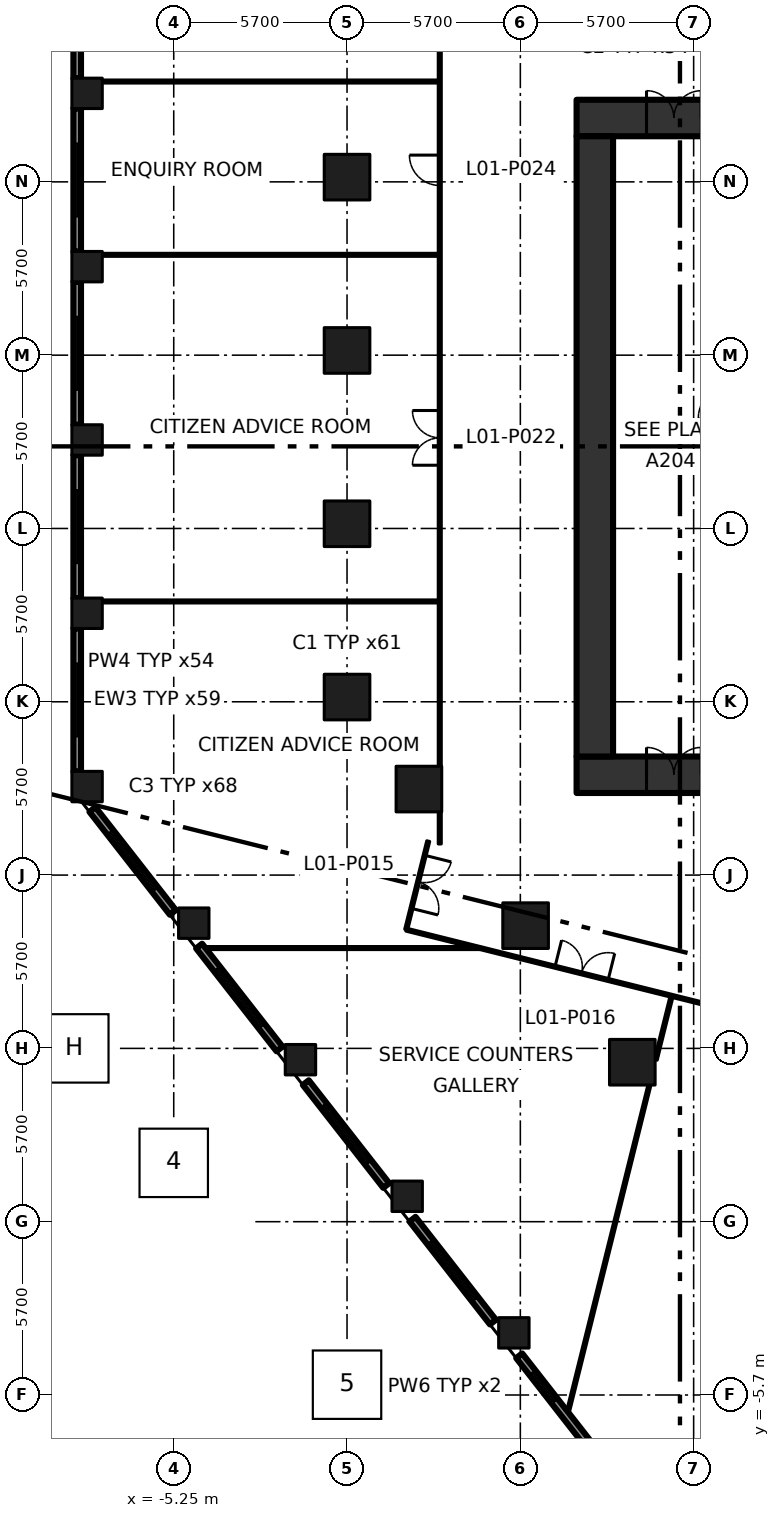
"""IFC4 building model, lengths in metres.
Left out: names, types, materials, properties, quantities, classifications, styles, units other than length and angle.
Written with IfcOpenShell. Run it as: python <this file> out.ifc"""

import sys

from ifc_helpers import new_model, si_unit, direction, frame, frame_2d, origin, origin_2d, place, context, subcontext, project, spatial, rectangle, extrude, element, fill, save


model = new_model("IFC4")
c1 = context("Model", 3, precision=1e-05, world=origin(), true_north=direction((0.0, 1.0)))
c2 = subcontext(c1, "Body", "Model", "MODEL_VIEW")
j1 = project(units=[si_unit("LENGTHUNIT", "METRE"), si_unit("PLANEANGLEUNIT", "RADIAN")], contexts=[c1])
p1 = place(None, origin())
s1 = spatial("IfcSite", under=j1, at=p1, CompositionType="ELEMENT")
p2 = place(p1, origin())
s2 = spatial("IfcBuilding", under=s1, at=p2, CompositionType="ELEMENT")
p3 = place(p2, frame((0.0, 0.0, 7.2)))
s3 = spatial("IfcBuildingStorey", under=s2, at=p3, CompositionType="ELEMENT", Elevation=7.2)
for number, where, z_axis, x_axis in (
    (1, (0.45, 17.255, 0.0), (0.0, 0.0, 1.0), (1.0, 0.0, 0.0)),
    (2, (0.45, 22.955, 0.0), (0.0, 0.0, 1.0), (1.0, 0.0, 0.0)),
    (3, (0.45, 28.655, 0.0), (0.0, 0.0, 1.0), (1.0, 0.0, 0.0)),
    (4, (0.45, 34.355, 0.0), (0.0, 0.0, 1.0), (1.0, 0.0, 0.0)),
    (5, (9.833, 5.245, 0.0), (0.0, 0.0, 1.0), (1.0, 0.0, 0.0)),
    (6, (6.323, 9.737, 0.0), (0.0, 0.0, 1.0), (1.0, 0.0, 0.0)),
    (7, (2.814, 14.229, 0.0), (0.0, 0.0, 1.0), (1.0, 0.0, 0.0)),
):
    element("IfcColumn", number, at=place(p3, frame(where, z_axis=z_axis, x_axis=x_axis)), inside=s3, PredefinedType="COLUMN", context=c2, shape_type="SweptSolid", body=[
        extrude(rectangle(XDim=1.5, YDim=1.5, at=origin_2d()), origin(), (0.0, 0.0, 1.0), 5.4),
    ])
for number, where, z_axis, x_axis in (
    (8, (-8.1, 14.311, 0.0), (0.0, 0.0, 1.0), (1.0, 0.0, 0.0)),
    (9, (-8.1, 20.011, 0.0), (0.0, 0.0, 1.0), (1.0, 0.0, 0.0)),
    (10, (-8.1, 25.711, 0.0), (0.0, 0.0, 1.0), (1.0, 0.0, 0.0)),
    (11, (-8.1, 31.411, 0.0), (0.0, 0.0, 1.0), (1.0, 0.0, 0.0)),
    (12, (-8.1, 37.111, 0.0), (0.0, 0.0, 1.0), (1.0, 0.0, 0.0)),
    (13, (-4.591, 9.819, 0.0), (0.0, 0.0, 1.0), (1.0, 0.0, 0.0)),
    (14, (-1.082, 5.328, 0.0), (0.0, 0.0, 1.0), (1.0, 0.0, 0.0)),
    (15, (2.428, 0.836, 0.0), (0.0, 0.0, 1.0), (1.0, 0.0, 0.0)),
    (16, (5.937, -3.656, 0.0), (0.0, 0.0, 1.0), (1.0, 0.0, 0.0)),
):
    element("IfcColumn", number, at=place(p3, frame(where, z_axis=z_axis, x_axis=x_axis)), inside=s3, PredefinedType="COLUMN", context=c2, shape_type="SweptSolid", body=[
        extrude(rectangle(XDim=1.0, YDim=1.0, at=origin_2d()), origin(), (0.0, 0.0, 1.0), 5.4),
    ])
p4 = place(p3, frame((8.0, 14.7, -0.45), z_axis=(0.0, 0.0, 1.0), x_axis=(1.0, 0.0, 0.0)))
e17 = element("IfcWall", 17, at=p4, inside=s3, PredefinedType="SHEAR", context=c2, shape_type="SweptSolid", body=[
    extrude(rectangle(XDim=22.8, YDim=1.2, at=frame_2d((11.4, 0.0))), origin(), (0.0, 0.0, 1.0), 5.4),
])
p5 = place(p4, frame((2.3, 0.0, 0.45)))
e18 = element("IfcOpeningElement", 18, at=p5, cuts=e17, PredefinedType="OPENING", context=c2, shape_type="SweptSolid", body=[
    extrude(rectangle(XDim=1.8, YDim=2.1, at=frame_2d((0.9, 1.05))), frame((0.0, 0.61, 0.0), z_axis=(0.0, -1.0, 0.0), x_axis=(1.0, 0.0, 0.0)), (0.0, 0.0, 1.0), 1.22),
])
p6 = place(p3, frame((8.0, 36.3, -0.45), z_axis=(0.0, 0.0, 1.0), x_axis=(1.0, 0.0, 0.0)))
e19 = element("IfcWall", 19, at=p6, inside=s3, PredefinedType="SHEAR", context=c2, shape_type="SweptSolid", body=[
    extrude(rectangle(XDim=22.8, YDim=1.2, at=frame_2d((11.4, 0.0))), origin(), (0.0, 0.0, 1.0), 5.4),
])
p7 = place(p6, frame((2.3, 0.0, 0.45)))
e20 = element("IfcOpeningElement", 20, at=p7, cuts=e19, PredefinedType="OPENING", context=c2, shape_type="SweptSolid", body=[
    extrude(rectangle(XDim=1.8, YDim=2.1, at=frame_2d((0.9, 1.05))), frame((0.0, 0.61, 0.0), z_axis=(0.0, -1.0, 0.0), x_axis=(1.0, 0.0, 0.0)), (0.0, 0.0, 1.0), 1.22),
])
p8 = place(p3, frame((8.6, 15.3, -0.45), z_axis=(0.0, 0.0, 1.0), x_axis=(0.0, 1.0, 0.0)))
e21 = element("IfcWall", 21, at=p8, inside=s3, PredefinedType="SHEAR", context=c2, shape_type="SweptSolid", body=[
    extrude(rectangle(XDim=20.4, YDim=1.2, at=frame_2d((10.2, 0.0))), origin(), (0.0, 0.0, 1.0), 5.4),
])
p9 = place(p3, frame((2.395, 9.606, 0.0), z_axis=(0.0, 0.0, 1.0), x_axis=(0.970307527636, -0.241874558011, 0.0)))
e22 = element("IfcWall", 22, at=p9, inside=s3, PredefinedType="PARTITIONING", context=c2, shape_type="SweptSolid", body=[
    extrude(rectangle(XDim=16.859, YDim=0.1, at=frame_2d((8.43, 0.0))), origin(), (0.0, 0.0, 1.0), 4.95),
])
p10 = place(p9, frame((5.045, 0.0, 0.0)))
e23 = element("IfcOpeningElement", 23, at=p10, cuts=e22, PredefinedType="OPENING", context=c2, shape_type="SweptSolid", body=[
    extrude(rectangle(XDim=1.8, YDim=2.1, at=frame_2d((0.9, 1.05))), frame((0.0, 0.06, 0.0), z_axis=(0.0, -1.0, 0.0), x_axis=(1.0, 0.0, 0.0)), (0.0, 0.0, 1.0), 0.12),
])
p11 = place(p9, frame((12.28, 0.0, 0.0)))
e24 = element("IfcOpeningElement", 24, at=p11, cuts=e22, PredefinedType="OPENING", context=c2, shape_type="SweptSolid", body=[
    extrude(rectangle(XDim=1.0, YDim=2.1, at=frame_2d((0.5, 1.05))), frame((0.0, 0.06, 0.0), z_axis=(0.0, -1.0, 0.0), x_axis=(1.0, 0.0, 0.0)), (0.0, 0.0, 1.0), 0.12),
])
p12 = place(p3, frame((3.121, 12.517, 0.0), z_axis=(0.0, 0.0, 1.0), x_axis=(-0.241999491975, -0.970276376031, 0.0)))
e25 = element("IfcWall", 25, at=p12, inside=s3, PredefinedType="PARTITIONING", context=c2, shape_type="SweptSolid", body=[
    extrude(rectangle(XDim=3.0, YDim=0.1, at=frame_2d((1.5, 0.0))), origin(), (0.0, 0.0, 1.0), 4.95),
])
p13 = place(p12, frame((0.48, 0.0, 0.0)))
e26 = element("IfcOpeningElement", 26, at=p13, cuts=e25, PredefinedType="OPENING", context=c2, shape_type="SweptSolid", body=[
    extrude(rectangle(XDim=1.8, YDim=2.1, at=frame_2d((0.9, 1.05))), frame((0.0, 0.06, 0.0), z_axis=(0.0, -1.0, 0.0), x_axis=(1.0, 0.0, 0.0)), (0.0, 0.0, 1.0), 0.12),
])
p14 = place(p3, frame((3.5, 13.459, 0.0), z_axis=(0.0, 0.0, 1.0), x_axis=(0.0, -1.0, 0.0)))
e27 = element("IfcWall", 27, at=p14, inside=s3, PredefinedType="PARTITIONING", context=c2, shape_type="SweptSolid", body=[
    extrude(rectangle(XDim=1.036, YDim=0.1, at=frame_2d((0.518, 0.0))), origin(), (0.0, 0.0, 1.0), 4.95),
])
p15 = place(p3, frame((3.5, 14.999, 0.0), z_axis=(0.0, 0.0, 1.0), x_axis=(0.0, 1.0, 0.0)))
e28 = element("IfcWall", 28, at=p15, inside=s3, PredefinedType="PARTITIONING", context=c2, shape_type="SweptSolid", body=[
    extrude(rectangle(XDim=26.401, YDim=0.1, at=frame_2d((13.2, 0.0))), origin(), (0.0, 0.0, 1.0), 4.95),
])
p16 = place(p15, frame((9.881, 0.0, 0.0)))
e29 = element("IfcOpeningElement", 29, at=p16, cuts=e28, PredefinedType="OPENING", context=c2, shape_type="SweptSolid", body=[
    extrude(rectangle(XDim=1.8, YDim=2.1, at=frame_2d((0.9, 1.05))), frame((0.0, 0.06, 0.0), z_axis=(0.0, -1.0, 0.0), x_axis=(1.0, 0.0, 0.0)), (0.0, 0.0, 1.0), 0.12),
])
p17 = place(p15, frame((19.081, 0.0, 0.0)))
e30 = element("IfcOpeningElement", 30, at=p17, cuts=e28, PredefinedType="OPENING", context=c2, shape_type="SweptSolid", body=[
    extrude(rectangle(XDim=1.0, YDim=2.1, at=frame_2d((0.5, 1.05))), frame((0.0, 0.06, 0.0), z_axis=(0.0, -1.0, 0.0), x_axis=(1.0, 0.0, 0.0)), (0.0, 0.0, 1.0), 0.12),
])
p18 = place(p15, frame((23.581, 0.0, 0.0)))
e31 = element("IfcOpeningElement", 31, at=p18, cuts=e28, PredefinedType="OPENING", context=c2, shape_type="SweptSolid", body=[
    extrude(rectangle(XDim=1.8, YDim=2.1, at=frame_2d((0.9, 1.05))), frame((0.0, 0.06, 0.0), z_axis=(0.0, -1.0, 0.0), x_axis=(1.0, 0.0, 0.0)), (0.0, 0.0, 1.0), 0.12),
])
p19 = place(p3, frame((-4.205, 9.0, 0.0), z_axis=(0.0, 0.0, 1.0), x_axis=(1.0, 0.0, 0.0)))
e32 = element("IfcWall", 32, at=p19, inside=s3, PredefinedType="PARTITIONING", context=c2, shape_type="SweptSolid", body=[
    extrude(rectangle(XDim=9.031, YDim=0.1, at=frame_2d((4.515, 0.0))), origin(), (0.0, 0.0, 1.0), 4.95),
])
for number, where, z_axis, x_axis in (
    (33, (3.45, 20.4, 0.0), (0.0, 0.0, 1.0), (-1.0, 0.0, 0.0)),
    (34, (3.45, 31.8, 0.0), (0.0, 0.0, 1.0), (-1.0, 0.0, 0.0)),
    (35, (3.45, 37.5, 0.0), (0.0, 0.0, 1.0), (-1.0, 0.0, 0.0)),
):
    element("IfcWall", number, at=place(p3, frame(where, z_axis=z_axis, x_axis=x_axis)), inside=s3, PredefinedType="PARTITIONING", context=c2, shape_type="SweptSolid", body=[
        extrude(rectangle(XDim=11.03, YDim=0.1, at=frame_2d((5.515, 0.0))), origin(), (0.0, 0.0, 1.0), 4.95),
    ])
p20 = place(p3, frame((7.716, -6.257, 0.0), z_axis=(0.0, 0.0, 1.0), x_axis=(0.241891576484, 0.970303285177, 0.0)))
e36 = element("IfcWall", 36, at=p20, inside=s3, PredefinedType="PARTITIONING", context=c2, shape_type="SweptSolid", body=[
    extrude(rectangle(XDim=11.061, YDim=0.1, at=frame_2d((5.53, 0.0))), origin(), (0.0, 0.0, 1.0), 4.95),
])
p21 = place(p3, frame((10.603, 5.323, 0.0), z_axis=(0.0, 0.0, 1.0), x_axis=(0.241966521302, 0.970284598749, 0.0)))
e37 = element("IfcWall", 37, at=p21, inside=s3, PredefinedType="PARTITIONING", context=c2, shape_type="SweptSolid", body=[
    extrude(rectangle(XDim=2.12, YDim=0.1, at=frame_2d((1.06, 0.0))), origin(), (0.0, 0.0, 1.0), 4.95),
])
p22 = place(p3, frame((-8.425, 42.311, 0.0), z_axis=(0.0, 0.0, 1.0), x_axis=(0.0, -1.0, 0.0)))
e38 = element("IfcWall", 38, at=p22, inside=s3, PredefinedType="SOLIDWALL", context=c2, shape_type="SweptSolid", body=[
    extrude(rectangle(XDim=4.7, YDim=0.25, at=frame_2d((2.35, 0.0))), origin(), (0.0, 0.0, 1.0), 4.05),
])
p23 = place(p22, frame((1.15, 0.0, 0.9)))
e39 = element("IfcOpeningElement", 39, at=p23, cuts=e38, PredefinedType="OPENING", context=c2, shape_type="SweptSolid", body=[
    extrude(rectangle(XDim=2.4, YDim=2.7, at=frame_2d((1.2, 1.35))), frame((0.0, 0.135, 0.0), z_axis=(0.0, -1.0, 0.0), x_axis=(1.0, 0.0, 0.0)), (0.0, 0.0, 1.0), 0.27),
])
p24 = place(p3, frame((-8.425, 36.611, 0.0), z_axis=(0.0, 0.0, 1.0), x_axis=(0.0, -1.0, 0.0)))
e40 = element("IfcWall", 40, at=p24, inside=s3, PredefinedType="SOLIDWALL", context=c2, shape_type="SweptSolid", body=[
    extrude(rectangle(XDim=4.7, YDim=0.25, at=frame_2d((2.35, 0.0))), origin(), (0.0, 0.0, 1.0), 4.05),
])
p25 = place(p24, frame((1.15, 0.0, 0.9)))
e41 = element("IfcOpeningElement", 41, at=p25, cuts=e40, PredefinedType="OPENING", context=c2, shape_type="SweptSolid", body=[
    extrude(rectangle(XDim=2.4, YDim=2.7, at=frame_2d((1.2, 1.35))), frame((0.0, 0.135, 0.0), z_axis=(0.0, -1.0, 0.0), x_axis=(1.0, 0.0, 0.0)), (0.0, 0.0, 1.0), 0.27),
])
p26 = place(p3, frame((-8.425, 30.911, 0.0), z_axis=(0.0, 0.0, 1.0), x_axis=(0.0, -1.0, 0.0)))
e42 = element("IfcWall", 42, at=p26, inside=s3, PredefinedType="SOLIDWALL", context=c2, shape_type="SweptSolid", body=[
    extrude(rectangle(XDim=4.7, YDim=0.25, at=frame_2d((2.35, 0.0))), origin(), (0.0, 0.0, 1.0), 4.05),
])
p27 = place(p26, frame((1.15, 0.0, 0.9)))
e43 = element("IfcOpeningElement", 43, at=p27, cuts=e42, PredefinedType="OPENING", context=c2, shape_type="SweptSolid", body=[
    extrude(rectangle(XDim=2.4, YDim=2.7, at=frame_2d((1.2, 1.35))), frame((0.0, 0.135, 0.0), z_axis=(0.0, -1.0, 0.0), x_axis=(1.0, 0.0, 0.0)), (0.0, 0.0, 1.0), 0.27),
])
p28 = place(p3, frame((-8.425, 25.211, 0.0), z_axis=(0.0, 0.0, 1.0), x_axis=(0.0, -1.0, 0.0)))
e44 = element("IfcWall", 44, at=p28, inside=s3, PredefinedType="SOLIDWALL", context=c2, shape_type="SweptSolid", body=[
    extrude(rectangle(XDim=4.7, YDim=0.25, at=frame_2d((2.35, 0.0))), origin(), (0.0, 0.0, 1.0), 4.05),
])
p29 = place(p28, frame((1.15, 0.0, 0.9)))
e45 = element("IfcOpeningElement", 45, at=p29, cuts=e44, PredefinedType="OPENING", context=c2, shape_type="SweptSolid", body=[
    extrude(rectangle(XDim=2.4, YDim=2.7, at=frame_2d((1.2, 1.35))), frame((0.0, 0.135, 0.0), z_axis=(0.0, -1.0, 0.0), x_axis=(1.0, 0.0, 0.0)), (0.0, 0.0, 1.0), 0.27),
])
p30 = place(p3, frame((-8.425, 19.511, 0.0), z_axis=(0.0, 0.0, 1.0), x_axis=(0.0, -1.0, 0.0)))
e46 = element("IfcWall", 46, at=p30, inside=s3, PredefinedType="SOLIDWALL", context=c2, shape_type="SweptSolid", body=[
    extrude(rectangle(XDim=4.7, YDim=0.25, at=frame_2d((2.35, 0.0))), origin(), (0.0, 0.0, 1.0), 4.05),
])
p31 = place(p30, frame((1.15, 0.0, 0.9)))
e47 = element("IfcOpeningElement", 47, at=p31, cuts=e46, PredefinedType="OPENING", context=c2, shape_type="SweptSolid", body=[
    extrude(rectangle(XDim=2.4, YDim=2.7, at=frame_2d((1.2, 1.35))), frame((0.0, 0.135, 0.0), z_axis=(0.0, -1.0, 0.0), x_axis=(1.0, 0.0, 0.0)), (0.0, 0.0, 1.0), 0.27),
])
p32 = place(p3, frame((-7.924, 13.558, 0.0), z_axis=(0.0, 0.0, 1.0), x_axis=(0.615603242749, -0.788056246417, 0.0)))
e48 = element("IfcWall", 48, at=p32, inside=s3, PredefinedType="SOLIDWALL", context=c2, shape_type="SweptSolid", body=[
    extrude(rectangle(XDim=4.297, YDim=0.25, at=frame_2d((2.148, 0.0))), origin(), (0.0, 0.0, 1.0), 4.05),
])
p33 = place(p32, frame((0.948, 0.0, 0.9)))
e49 = element("IfcOpeningElement", 49, at=p33, cuts=e48, PredefinedType="OPENING", context=c2, shape_type="SweptSolid", body=[
    extrude(rectangle(XDim=2.4, YDim=2.7, at=frame_2d((1.2, 1.35))), frame((0.0, 0.135, 0.0), z_axis=(0.0, -1.0, 0.0), x_axis=(1.0, 0.0, 0.0)), (0.0, 0.0, 1.0), 0.27),
])
p34 = place(p3, frame((-4.415, 9.066, 0.0), z_axis=(0.0, 0.0, 1.0), x_axis=(0.615713519567, -0.787970089421, 0.0)))
e50 = element("IfcWall", 50, at=p34, inside=s3, PredefinedType="SOLIDWALL", context=c2, shape_type="SweptSolid", body=[
    extrude(rectangle(XDim=4.296, YDim=0.25, at=frame_2d((2.148, 0.0))), origin(), (0.0, 0.0, 1.0), 4.05),
])
p35 = place(p34, frame((0.948, 0.0, 0.9)))
e51 = element("IfcOpeningElement", 51, at=p35, cuts=e50, PredefinedType="OPENING", context=c2, shape_type="SweptSolid", body=[
    extrude(rectangle(XDim=2.4, YDim=2.7, at=frame_2d((1.2, 1.35))), frame((0.0, 0.135, 0.0), z_axis=(0.0, -1.0, 0.0), x_axis=(1.0, 0.0, 0.0)), (0.0, 0.0, 1.0), 0.27),
])
p36 = place(p3, frame((-0.906, 4.575, 0.0), z_axis=(0.0, 0.0, 1.0), x_axis=(0.61574436495, -0.787945986113, 0.0)))
e52 = element("IfcWall", 52, at=p36, inside=s3, PredefinedType="SOLIDWALL", context=c2, shape_type="SweptSolid", body=[
    extrude(rectangle(XDim=4.297, YDim=0.25, at=frame_2d((2.148, 0.0))), origin(), (0.0, 0.0, 1.0), 4.05),
])
p37 = place(p36, frame((0.949, 0.0, 0.9)))
e53 = element("IfcOpeningElement", 53, at=p37, cuts=e52, PredefinedType="OPENING", context=c2, shape_type="SweptSolid", body=[
    extrude(rectangle(XDim=2.4, YDim=2.7, at=frame_2d((1.2, 1.35))), frame((0.0, 0.135, 0.0), z_axis=(0.0, -1.0, 0.0), x_axis=(1.0, 0.0, 0.0)), (0.0, 0.0, 1.0), 0.27),
])
p38 = place(p3, frame((2.604, 0.083, 0.0), z_axis=(0.0, 0.0, 1.0), x_axis=(0.615603242749, -0.788056246417, 0.0)))
e54 = element("IfcWall", 54, at=p38, inside=s3, PredefinedType="SOLIDWALL", context=c2, shape_type="SweptSolid", body=[
    extrude(rectangle(XDim=4.297, YDim=0.25, at=frame_2d((2.148, 0.0))), origin(), (0.0, 0.0, 1.0), 4.05),
])
p39 = place(p38, frame((0.948, 0.0, 0.9)))
e55 = element("IfcOpeningElement", 55, at=p39, cuts=e54, PredefinedType="OPENING", context=c2, shape_type="SweptSolid", body=[
    extrude(rectangle(XDim=2.4, YDim=2.7, at=frame_2d((1.2, 1.35))), frame((0.0, 0.135, 0.0), z_axis=(0.0, -1.0, 0.0), x_axis=(1.0, 0.0, 0.0)), (0.0, 0.0, 1.0), 0.27),
])
p40 = place(p3, frame((6.113, -4.409, 0.0), z_axis=(0.0, 0.0, 1.0), x_axis=(0.615603242749, -0.788056246417, 0.0)))
e56 = element("IfcWall", 56, at=p40, inside=s3, PredefinedType="SOLIDWALL", context=c2, shape_type="SweptSolid", body=[
    extrude(rectangle(XDim=4.297, YDim=0.25, at=frame_2d((2.148, 0.0))), origin(), (0.0, 0.0, 1.0), 4.05),
])
p41 = place(p40, frame((0.702, 0.0, 0.9)))
e57 = element("IfcOpeningElement", 57, at=p41, cuts=e56, PredefinedType="OPENING", context=c2, shape_type="SweptSolid", body=[
    extrude(rectangle(XDim=1.2, YDim=2.7, at=frame_2d((0.6, 1.35))), frame((0.0, 0.135, 0.0), z_axis=(0.0, -1.0, 0.0), x_axis=(1.0, 0.0, 0.0)), (0.0, 0.0, 1.0), 0.27),
])
p42 = place(p7, origin())
e58 = element("IfcDoor", 58, at=p42, inside=s3, OperationType="DOUBLE_DOOR_SINGLE_SWING", PredefinedType="DOOR", context=c2, shape_type="SweptSolid", body=[
    extrude(rectangle(XDim=1.8, YDim=2.1, at=frame_2d((0.9, 1.05))), frame((0.0, 0.025, 0.0), z_axis=(0.0, -1.0, 0.0), x_axis=(1.0, 0.0, 0.0)), (0.0, 0.0, 1.0), 0.05),
])
fill(e20, e58)
p43 = place(p5, origin())
e59 = element("IfcDoor", 59, at=p43, inside=s3, OperationType="DOUBLE_DOOR_SINGLE_SWING", PredefinedType="DOOR", context=c2, shape_type="SweptSolid", body=[
    extrude(rectangle(XDim=1.8, YDim=2.1, at=frame_2d((0.9, 1.05))), frame((0.0, 0.025, 0.0), z_axis=(0.0, -1.0, 0.0), x_axis=(1.0, 0.0, 0.0)), (0.0, 0.0, 1.0), 0.05),
])
fill(e18, e59)
p44 = place(p13, origin())
e60 = element("IfcDoor", 60, at=p44, inside=s3, OperationType="DOUBLE_DOOR_SINGLE_SWING", PredefinedType="DOOR", context=c2, shape_type="SweptSolid", body=[
    extrude(rectangle(XDim=1.8, YDim=2.1, at=frame_2d((0.9, 1.05))), frame((0.0, 0.025, 0.0), z_axis=(0.0, -1.0, 0.0), x_axis=(1.0, 0.0, 0.0)), (0.0, 0.0, 1.0), 0.05),
])
fill(e26, e60)
p45 = place(p10, origin())
e61 = element("IfcDoor", 61, at=p45, inside=s3, OperationType="DOUBLE_DOOR_SINGLE_SWING", PredefinedType="DOOR", context=c2, shape_type="SweptSolid", body=[
    extrude(rectangle(XDim=1.8, YDim=2.1, at=frame_2d((0.9, 1.05))), frame((0.0, 0.025, 0.0), z_axis=(0.0, -1.0, 0.0), x_axis=(1.0, 0.0, 0.0)), (0.0, 0.0, 1.0), 0.05),
])
fill(e23, e61)
p46 = place(p16, origin())
e62 = element("IfcDoor", 62, at=p46, inside=s3, OperationType="DOUBLE_DOOR_SINGLE_SWING", PredefinedType="DOOR", context=c2, shape_type="SweptSolid", body=[
    extrude(rectangle(XDim=1.8, YDim=2.1, at=frame_2d((0.9, 1.05))), frame((0.0, 0.025, 0.0), z_axis=(0.0, -1.0, 0.0), x_axis=(1.0, 0.0, 0.0)), (0.0, 0.0, 1.0), 0.05),
])
fill(e29, e62)
p47 = place(p17, origin())
e63 = element("IfcDoor", 63, at=p47, inside=s3, OperationType="SINGLE_SWING_RIGHT", PredefinedType="DOOR", context=c2, shape_type="SweptSolid", body=[
    extrude(rectangle(XDim=1.0, YDim=2.1, at=frame_2d((0.5, 1.05))), frame((0.0, 0.025, 0.0), z_axis=(0.0, -1.0, 0.0), x_axis=(1.0, 0.0, 0.0)), (0.0, 0.0, 1.0), 0.05),
])
fill(e30, e63)
p48 = place(p25, origin())
e64 = element("IfcWindow", 64, at=p48, inside=s3, PartitioningType="DOUBLE_PANEL_VERTICAL", PredefinedType="WINDOW", context=c2, shape_type="SweptSolid", body=[
    extrude(rectangle(XDim=2.4, YDim=2.7, at=frame_2d((1.2, 1.35))), frame((0.0, 0.03, 0.0), z_axis=(0.0, -1.0, 0.0), x_axis=(1.0, 0.0, 0.0)), (0.0, 0.0, 1.0), 0.06),
])
fill(e41, e64)
p49 = place(p27, origin())
e65 = element("IfcWindow", 65, at=p49, inside=s3, PartitioningType="DOUBLE_PANEL_VERTICAL", PredefinedType="WINDOW", context=c2, shape_type="SweptSolid", body=[
    extrude(rectangle(XDim=2.4, YDim=2.7, at=frame_2d((1.2, 1.35))), frame((0.0, 0.03, 0.0), z_axis=(0.0, -1.0, 0.0), x_axis=(1.0, 0.0, 0.0)), (0.0, 0.0, 1.0), 0.06),
])
fill(e43, e65)
p50 = place(p29, origin())
e66 = element("IfcWindow", 66, at=p50, inside=s3, PartitioningType="DOUBLE_PANEL_VERTICAL", PredefinedType="WINDOW", context=c2, shape_type="SweptSolid", body=[
    extrude(rectangle(XDim=2.4, YDim=2.7, at=frame_2d((1.2, 1.35))), frame((0.0, 0.03, 0.0), z_axis=(0.0, -1.0, 0.0), x_axis=(1.0, 0.0, 0.0)), (0.0, 0.0, 1.0), 0.06),
])
fill(e45, e66)
p51 = place(p31, origin())
e67 = element("IfcWindow", 67, at=p51, inside=s3, PartitioningType="DOUBLE_PANEL_VERTICAL", PredefinedType="WINDOW", context=c2, shape_type="SweptSolid", body=[
    extrude(rectangle(XDim=2.4, YDim=2.7, at=frame_2d((1.2, 1.35))), frame((0.0, 0.03, 0.0), z_axis=(0.0, -1.0, 0.0), x_axis=(1.0, 0.0, 0.0)), (0.0, 0.0, 1.0), 0.06),
])
fill(e47, e67)
p52 = place(p33, origin())
e68 = element("IfcWindow", 68, at=p52, inside=s3, PartitioningType="DOUBLE_PANEL_VERTICAL", PredefinedType="WINDOW", context=c2, shape_type="SweptSolid", body=[
    extrude(rectangle(XDim=2.4, YDim=2.7, at=frame_2d((1.2, 1.35))), frame((0.0, 0.03, 0.0), z_axis=(0.0, -1.0, 0.0), x_axis=(1.0, 0.0, 0.0)), (0.0, 0.0, 1.0), 0.06),
])
fill(e49, e68)
p53 = place(p35, origin())
e69 = element("IfcWindow", 69, at=p53, inside=s3, PartitioningType="DOUBLE_PANEL_VERTICAL", PredefinedType="WINDOW", context=c2, shape_type="SweptSolid", body=[
    extrude(rectangle(XDim=2.4, YDim=2.7, at=frame_2d((1.2, 1.35))), frame((0.0, 0.03, 0.0), z_axis=(0.0, -1.0, 0.0), x_axis=(1.0, 0.0, 0.0)), (0.0, 0.0, 1.0), 0.06),
])
fill(e51, e69)
p54 = place(p37, origin())
e70 = element("IfcWindow", 70, at=p54, inside=s3, PartitioningType="DOUBLE_PANEL_VERTICAL", PredefinedType="WINDOW", context=c2, shape_type="SweptSolid", body=[
    extrude(rectangle(XDim=2.4, YDim=2.7, at=frame_2d((1.2, 1.35))), frame((0.0, 0.03, 0.0), z_axis=(0.0, -1.0, 0.0), x_axis=(1.0, 0.0, 0.0)), (0.0, 0.0, 1.0), 0.06),
])
fill(e53, e70)
p55 = place(p39, origin())
e71 = element("IfcWindow", 71, at=p55, inside=s3, PartitioningType="DOUBLE_PANEL_VERTICAL", PredefinedType="WINDOW", context=c2, shape_type="SweptSolid", body=[
    extrude(rectangle(XDim=2.4, YDim=2.7, at=frame_2d((1.2, 1.35))), frame((0.0, 0.03, 0.0), z_axis=(0.0, -1.0, 0.0), x_axis=(1.0, 0.0, 0.0)), (0.0, 0.0, 1.0), 0.06),
])
fill(e55, e71)
p56 = place(p41, origin())
e72 = element("IfcWindow", 72, at=p56, inside=s3, PartitioningType="SINGLE_PANEL", PredefinedType="WINDOW", context=c2, shape_type="SweptSolid", body=[
    extrude(rectangle(XDim=1.2, YDim=2.7, at=frame_2d((0.6, 1.35))), frame((0.0, 0.03, 0.0), z_axis=(0.0, -1.0, 0.0), x_axis=(1.0, 0.0, 0.0)), (0.0, 0.0, 1.0), 0.06),
])
fill(e57, e72)
save(model, sys.argv[1])
